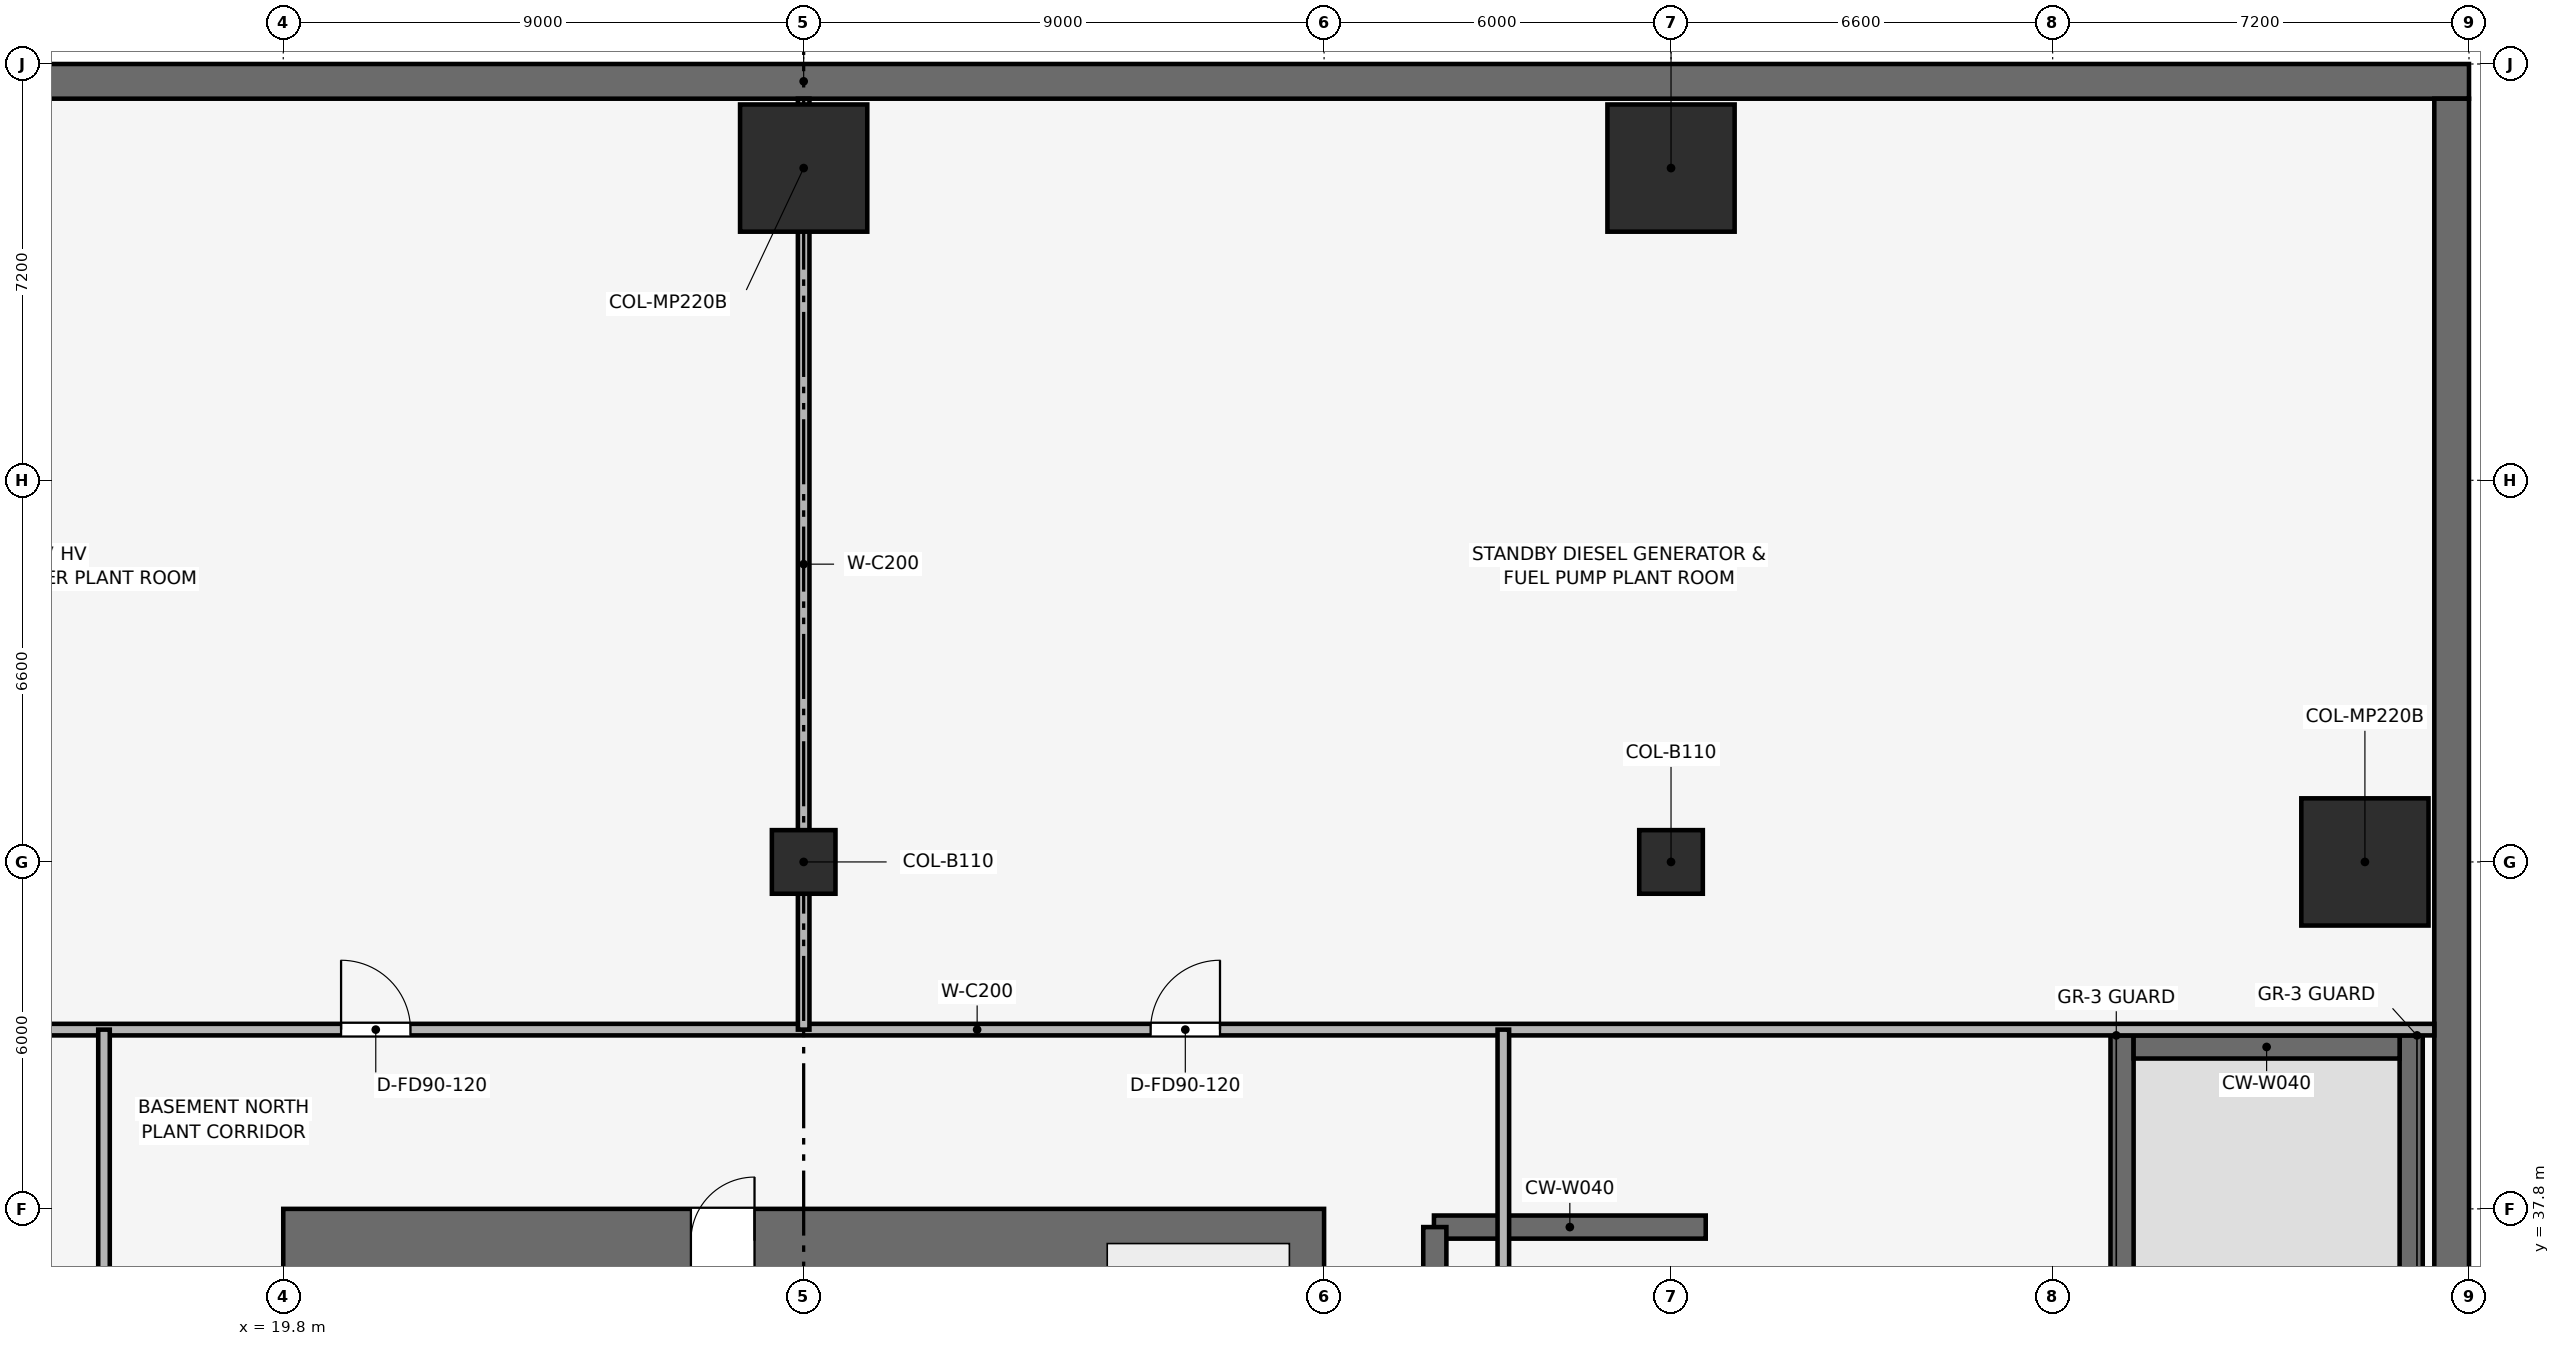
"""IFC4 building model, lengths in metres.
Left out: names, types, materials, properties, quantities, classifications, styles, units other than length and angle.
Written with IfcOpenShell. Run it as: python <this file> out.ifc"""

import sys

from ifc_helpers import new_model, si_unit, direction, frame, frame_2d, origin, origin_2d, place, context, subcontext, project, spatial, rectangle, extrude, element, fill, save


model = new_model("IFC4")
c1 = context("Model", 3, precision=1e-05, world=origin(), true_north=direction((0.0, 1.0)))
c2 = subcontext(c1, "Body", "Model", "MODEL_VIEW")
j1 = project(units=[si_unit("LENGTHUNIT", "METRE"), si_unit("PLANEANGLEUNIT", "RADIAN")], contexts=[c1])
p1 = place(None, origin())
s1 = spatial("IfcSite", under=j1, at=p1, CompositionType="ELEMENT")
p2 = place(p1, origin())
s2 = spatial("IfcBuilding", under=s1, at=p2, CompositionType="ELEMENT")
p3 = place(p2, frame((0.0, 0.0, -9.6)))
s3 = spatial("IfcBuildingStorey", under=s2, at=p3, CompositionType="ELEMENT", Elevation=-9.6)
p4 = place(p3, frame((0.0, 57.3, 0.0), z_axis=(0.0, 0.0, 1.0), x_axis=(1.0, 0.0, 0.0)))
e1 = element("IfcWall", 1, at=p4, inside=s3, PredefinedType="SOLIDWALL", context=c2, shape_type="SweptSolid", body=[
    extrude(rectangle(XDim=57.6, YDim=0.6, at=frame_2d((28.8, 0.0))), origin(), (0.0, 0.0, 1.0), 4.8),
])
p5 = place(p3, frame((57.3, 0.6, 0.0), z_axis=(0.0, 0.0, 1.0), x_axis=(0.0, 1.0, 0.0)))
e2 = element("IfcWall", 2, at=p5, inside=s3, PredefinedType="SOLIDWALL", context=c2, shape_type="SweptSolid", body=[
    extrude(rectangle(XDim=56.4, YDim=0.6, at=frame_2d((28.2, 0.0))), origin(), (0.0, 0.0, 1.0), 4.8),
])
p6 = place(p3, frame((19.8, 37.25, 0.0), z_axis=(0.0, 0.0, 1.0), x_axis=(1.0, 0.0, 0.0)))
e3 = element("IfcWall", 3, at=p6, inside=s3, PredefinedType="SHEAR", context=c2, shape_type="SweptSolid", body=[
    extrude(rectangle(XDim=18.0, YDim=1.1, at=frame_2d((9.0, 0.0))), origin(), (0.0, 0.0, 1.0), 4.8),
])
p7 = place(p6, frame((7.05, 0.0, 0.0)))
e4 = element("IfcOpeningElement", 4, at=p7, cuts=e3, PredefinedType="OPENING", context=c2, shape_type="SweptSolid", body=[
    extrude(rectangle(XDim=1.1, YDim=2.15, at=frame_2d((0.55, 1.075))), frame((0.0, 0.56, 0.0), z_axis=(0.0, -1.0, 0.0), x_axis=(1.0, 0.0, 0.0)), (0.0, 0.0, 1.0), 1.12),
])
for number, where, z_axis, x_axis in (
    (5, (55.8, 43.8, 0.0), (0.0, 0.0, 1.0), (1.0, 0.0, 0.0)),
    (6, (43.8, 55.8, 0.0), (0.0, 0.0, 1.0), (1.0, 0.0, 0.0)),
    (7, (28.8, 55.8, 0.0), (0.0, 0.0, 1.0), (1.0, 0.0, 0.0)),
):
    element("IfcColumn", number, at=place(p3, frame(where, z_axis=z_axis, x_axis=x_axis)), inside=s3, PredefinedType="COLUMN", context=c2, shape_type="SweptSolid", body=[
        extrude(rectangle(XDim=2.2, YDim=2.2, at=origin_2d()), origin(), (0.0, 0.0, 1.0), 4.798),
    ])
for number, where, z_axis, x_axis in (
    (8, (28.8, 43.8, 0.0), (0.0, 0.0, 1.0), (1.0, 0.0, 0.0)),
    (9, (43.8, 43.8, 0.0), (0.0, 0.0, 1.0), (1.0, 0.0, 0.0)),
):
    element("IfcColumn", number, at=place(p3, frame(where, z_axis=z_axis, x_axis=x_axis)), inside=s3, PredefinedType="COLUMN", context=c2, shape_type="SweptSolid", body=[
        extrude(rectangle(XDim=1.1, YDim=1.1, at=origin_2d()), origin(), (0.0, 0.0, 1.0), 4.798),
    ])
for number, where, z_axis, x_axis in (
    (10, (51.6, 11.6, 0.0), (0.0, 0.0, 1.0), (0.0, 1.0, 0.0)),
    (11, (56.6, 11.6, 0.0), (0.0, 0.0, 1.0), (0.0, 1.0, 0.0)),
):
    element("IfcWall", number, at=place(p3, frame(where, z_axis=z_axis, x_axis=x_axis)), inside=s3, PredefinedType="SHEAR", context=c2, shape_type="SweptSolid", body=[
        extrude(rectangle(XDim=29.2, YDim=0.4, at=frame_2d((14.6, 0.0))), origin(), (0.0, 0.0, 1.0), 4.45),
    ])
p8 = place(p3, frame((51.8, 40.6, 0.0), z_axis=(0.0, 0.0, 1.0), x_axis=(1.0, 0.0, 0.0)))
e12 = element("IfcWall", 12, at=p8, inside=s3, PredefinedType="SHEAR", context=c2, shape_type="SweptSolid", body=[
    extrude(rectangle(XDim=4.6, YDim=0.4, at=frame_2d((2.3, 0.0))), origin(), (0.0, 0.0, 1.0), 4.45),
])
p9 = place(p3, frame((39.7, 37.485, 0.0), z_axis=(0.0, 0.0, 1.0), x_axis=(1.0, 0.0, 0.0)))
e13 = element("IfcWall", 13, at=p9, inside=s3, PredefinedType="SHEAR", context=c2, shape_type="SweptSolid", body=[
    extrude(rectangle(XDim=4.7, YDim=0.4, at=frame_2d((2.35, 0.0))), origin(), (0.0, 0.0, 1.0), 4.448),
])
p10 = place(p3, frame((39.715, 34.165, 0.0), z_axis=(0.0, 0.0, 1.0), x_axis=(0.0, 1.0, 0.0)))
e14 = element("IfcWall", 14, at=p10, inside=s3, PredefinedType="SHEAR", context=c2, shape_type="SweptSolid", body=[
    extrude(rectangle(XDim=3.32, YDim=0.4, at=frame_2d((1.66, 0.0))), origin(), (0.0, 0.0, 1.0), 4.448),
])
p11 = place(p3, frame((6.6, 40.9, 0.0), z_axis=(0.0, 0.0, 1.0), x_axis=(1.0, 0.0, 0.0)))
e15 = element("IfcWall", 15, at=p11, inside=s3, PredefinedType="PARTITIONING", context=c2, shape_type="SweptSolid", body=[
    extrude(rectangle(XDim=50.4, YDim=0.2, at=frame_2d((25.2, 0.0))), origin(), (0.0, 0.0, 1.0), 3.035),
])
p12 = place(p11, frame((14.2, 0.0, 0.0)))
e16 = element("IfcOpeningElement", 16, at=p12, cuts=e15, PredefinedType="OPENING", context=c2, shape_type="SweptSolid", body=[
    extrude(rectangle(XDim=1.2, YDim=2.2, at=frame_2d((0.6, 1.1))), frame((0.0, 0.11, 0.0), z_axis=(0.0, -1.0, 0.0), x_axis=(1.0, 0.0, 0.0)), (0.0, 0.0, 1.0), 0.22),
])
p13 = place(p11, frame((28.2, 0.0, 0.0)))
e17 = element("IfcOpeningElement", 17, at=p13, cuts=e15, PredefinedType="OPENING", context=c2, shape_type="SweptSolid", body=[
    extrude(rectangle(XDim=1.2, YDim=2.2, at=frame_2d((0.6, 1.1))), frame((0.0, 0.11, 0.0), z_axis=(0.0, -1.0, 0.0), x_axis=(1.0, 0.0, 0.0)), (0.0, 0.0, 1.0), 0.22),
])
p14 = place(p3, frame((16.7, 16.7, 0.0), z_axis=(0.0, 0.0, 1.0), x_axis=(0.0, 1.0, 0.0)))
e18 = element("IfcWall", 18, at=p14, inside=s3, PredefinedType="PARTITIONING", context=c2, shape_type="SweptSolid", body=[
    extrude(rectangle(XDim=24.2, YDim=0.2, at=frame_2d((12.1, 0.0))), origin(), (0.0, 0.0, 1.0), 3.035),
])
p15 = place(p14, frame((9.2, 0.0, 0.0)))
e19 = element("IfcOpeningElement", 19, at=p15, cuts=e18, PredefinedType="OPENING", context=c2, shape_type="SweptSolid", body=[
    extrude(rectangle(XDim=1.2, YDim=2.2, at=frame_2d((0.6, 1.1))), frame((0.0, 0.11, 0.0), z_axis=(0.0, -1.0, 0.0), x_axis=(1.0, 0.0, 0.0)), (0.0, 0.0, 1.0), 0.22),
])
p16 = place(p3, frame((40.9, 16.7, 0.0), z_axis=(0.0, 0.0, 1.0), x_axis=(0.0, 1.0, 0.0)))
e20 = element("IfcWall", 20, at=p16, inside=s3, PredefinedType="PARTITIONING", context=c2, shape_type="SweptSolid", body=[
    extrude(rectangle(XDim=24.2, YDim=0.2, at=frame_2d((12.1, 0.0))), origin(), (0.0, 0.0, 1.0), 3.035),
])
p17 = place(p16, frame((9.2, 0.0, 0.0)))
e21 = element("IfcOpeningElement", 21, at=p17, cuts=e20, PredefinedType="OPENING", context=c2, shape_type="SweptSolid", body=[
    extrude(rectangle(XDim=1.2, YDim=2.2, at=frame_2d((0.6, 1.1))), frame((0.0, 0.11, 0.0), z_axis=(0.0, -1.0, 0.0), x_axis=(1.0, 0.0, 0.0)), (0.0, 0.0, 1.0), 0.22),
])
p18 = place(p3, frame((28.8, 40.9, 0.0), z_axis=(0.0, 0.0, 1.0), x_axis=(0.0, 1.0, 0.0)))
e22 = element("IfcWall", 22, at=p18, inside=s3, PredefinedType="PARTITIONING", context=c2, shape_type="SweptSolid", body=[
    extrude(rectangle(XDim=16.1, YDim=0.2, at=frame_2d((8.05, 0.0))), origin(), (0.0, 0.0, 1.0), 3.035),
])
p19 = place(p12, origin())
e23 = element("IfcDoor", 23, at=p19, inside=s3, OperationType="SINGLE_SWING_LEFT", PredefinedType="DOOR", context=c2, shape_type="SweptSolid", body=[
    extrude(rectangle(XDim=1.2, YDim=2.2, at=frame_2d((0.6, 1.1))), frame((0.0, 0.025, 0.0), z_axis=(0.0, -1.0, 0.0), x_axis=(1.0, 0.0, 0.0)), (0.0, 0.0, 1.0), 0.05),
])
fill(e16, e23)
p20 = place(p13, origin())
e24 = element("IfcDoor", 24, at=p20, inside=s3, OperationType="SINGLE_SWING_RIGHT", PredefinedType="DOOR", context=c2, shape_type="SweptSolid", body=[
    extrude(rectangle(XDim=1.2, YDim=2.2, at=frame_2d((0.6, 1.1))), frame((0.0, 0.025, 0.0), z_axis=(0.0, -1.0, 0.0), x_axis=(1.0, 0.0, 0.0)), (0.0, 0.0, 1.0), 0.05),
])
fill(e17, e24)
p21 = place(p7, origin())
e25 = element("IfcDoor", 25, at=p21, inside=s3, OperationType="SINGLE_SWING_RIGHT", PredefinedType="DOOR", context=c2, shape_type="SweptSolid", body=[
    extrude(rectangle(XDim=1.1, YDim=2.15, at=frame_2d((0.55, 1.075))), frame((0.0, 0.025, 0.0), z_axis=(0.0, -1.0, 0.0), x_axis=(1.0, 0.0, 0.0)), (0.0, 0.0, 1.0), 0.05),
])
fill(e4, e25)
save(model, sys.argv[1])
